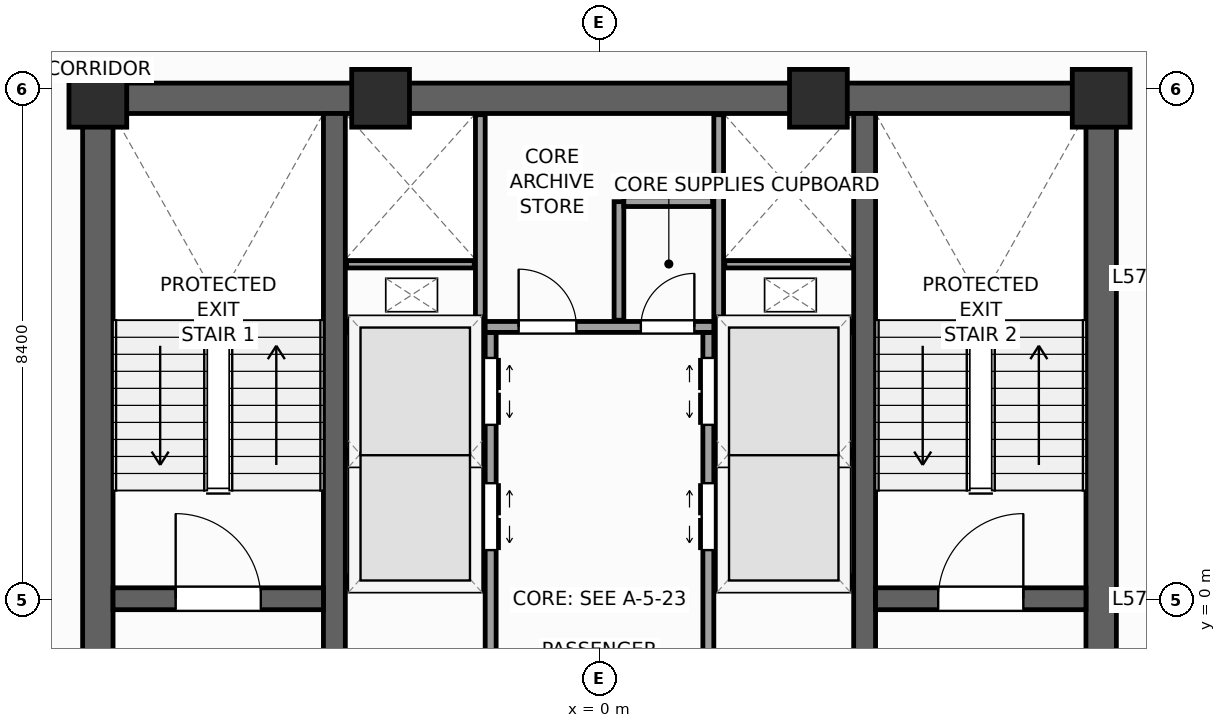
"""IFC4 building model, lengths in metres.
Left out: names, types, materials, properties, quantities, classifications, styles, units other than length and angle.
Written with IfcOpenShell. Run it as: python <this file> out.ifc"""

import sys

from ifc_helpers import new_model, si_unit, direction, frame, frame_2d, origin, origin_2d, place, context, subcontext, project, spatial, rectangle, extrude, source, transform, mapped, element, fill, save


model = new_model("IFC4")
c1 = context("Model", 3, precision=1e-05, world=origin(), true_north=direction((0.0, 1.0)))
c2 = subcontext(c1, "Body", "Model", "MODEL_VIEW")
j1 = project(units=[si_unit("LENGTHUNIT", "METRE"), si_unit("PLANEANGLEUNIT", "RADIAN")], contexts=[c1])
p1 = place(None, origin())
s1 = spatial("IfcSite", under=j1, at=p1, CompositionType="ELEMENT")
p2 = place(p1, origin())
s2 = spatial("IfcBuilding", under=s1, at=p2, CompositionType="ELEMENT")
p3 = place(p2, frame((0.0, 0.0, 236.8)))
s3 = spatial("IfcBuildingStorey", under=s2, at=p3, CompositionType="ELEMENT", Elevation=236.8)
p4 = place(p3, frame((-8.5, 8.25, 0.0), z_axis=(0.0, 0.0, 1.0), x_axis=(1.0, 0.0, 0.0)))
e1 = element("IfcWall", 1, at=p4, inside=s3, PredefinedType="SHEAR", context=c2, shape_type="SweptSolid", body=[
    extrude(rectangle(XDim=17.0, YDim=0.5, at=frame_2d((8.5, 0.0))), origin(), (0.0, 0.0, 1.0), 3.9),
])
p5 = place(p3, frame((-8.25, -8.0, 0.0), z_axis=(0.0, 0.0, 1.0), x_axis=(0.0, 1.0, 0.0)))
e2 = element("IfcWall", 2, at=p5, inside=s3, PredefinedType="SHEAR", context=c2, shape_type="SweptSolid", body=[
    extrude(rectangle(XDim=16.0, YDim=0.5, at=frame_2d((8.0, 0.0))), origin(), (0.0, 0.0, 1.0), 3.9),
])
p6 = place(p5, frame((4.69, 0.0, 0.0)))
e3 = element("IfcOpeningElement", 3, at=p6, cuts=e2, PredefinedType="OPENING", context=c2, shape_type="SweptSolid", body=[
    extrude(rectangle(XDim=1.3, YDim=2.2, at=frame_2d((0.65, 1.1))), frame((0.0, 0.26, 0.0), z_axis=(0.0, -1.0, 0.0), x_axis=(1.0, 0.0, 0.0)), (0.0, 0.0, 1.0), 0.52),
])
p7 = place(p3, frame((8.25, -8.0, 0.0), z_axis=(0.0, 0.0, 1.0), x_axis=(0.0, 1.0, 0.0)))
e4 = element("IfcWall", 4, at=p7, inside=s3, PredefinedType="SHEAR", context=c2, shape_type="SweptSolid", body=[
    extrude(rectangle(XDim=16.0, YDim=0.5, at=frame_2d((8.0, 0.0))), origin(), (0.0, 0.0, 1.0), 3.9),
])
p8 = place(p7, frame((4.69, 0.0, 0.0)))
e5 = element("IfcOpeningElement", 5, at=p8, cuts=e4, PredefinedType="OPENING", context=c2, shape_type="SweptSolid", body=[
    extrude(rectangle(XDim=1.3, YDim=2.2, at=frame_2d((0.65, 1.1))), frame((0.0, 0.26, 0.0), z_axis=(0.0, -1.0, 0.0), x_axis=(1.0, 0.0, 0.0)), (0.0, 0.0, 1.0), 0.52),
])
for number, where, z_axis, x_axis in (
    (6, (-4.36, -8.0, 0.0), (0.0, 0.0, 1.0), (0.0, 1.0, 0.0)),
    (7, (4.36, -8.0, 0.0), (0.0, 0.0, 1.0), (0.0, 1.0, 0.0)),
):
    element("IfcWall", number, at=place(p3, frame(where, z_axis=z_axis, x_axis=x_axis)), inside=s3, PredefinedType="SHEAR", context=c2, shape_type="SweptSolid", body=[
        extrude(rectangle(XDim=16.0, YDim=0.36, at=frame_2d((8.0, 0.0))), origin(), (0.0, 0.0, 1.0), 3.9),
    ])
p9 = place(p3, frame((-8.0, 0.02, 0.0), z_axis=(0.0, 0.0, 1.0), x_axis=(1.0, 0.0, 0.0)))
e8 = element("IfcWall", 8, at=p9, inside=s3, PredefinedType="SHEAR", context=c2, shape_type="SweptSolid", body=[
    extrude(rectangle(XDim=3.46, YDim=0.36, at=frame_2d((1.73, 0.0))), origin(), (0.0, 0.0, 1.0), 3.9),
])
p10 = place(p9, frame((1.03, 0.0, 0.0)))
e9 = element("IfcOpeningElement", 9, at=p10, cuts=e8, PredefinedType="OPENING", context=c2, shape_type="SweptSolid", body=[
    extrude(rectangle(XDim=1.4, YDim=2.2, at=frame_2d((0.7, 1.1))), frame((0.0, 0.19, 0.0), z_axis=(0.0, -1.0, 0.0), x_axis=(1.0, 0.0, 0.0)), (0.0, 0.0, 1.0), 0.38),
])
p11 = place(p3, frame((4.54, 0.02, 0.0), z_axis=(0.0, 0.0, 1.0), x_axis=(1.0, 0.0, 0.0)))
e10 = element("IfcWall", 10, at=p11, inside=s3, PredefinedType="SHEAR", context=c2, shape_type="SweptSolid", body=[
    extrude(rectangle(XDim=3.46, YDim=0.36, at=frame_2d((1.73, 0.0))), origin(), (0.0, 0.0, 1.0), 3.9),
])
p12 = place(p11, frame((1.03, 0.0, 0.0)))
e11 = element("IfcOpeningElement", 11, at=p12, cuts=e10, PredefinedType="OPENING", context=c2, shape_type="SweptSolid", body=[
    extrude(rectangle(XDim=1.4, YDim=2.2, at=frame_2d((0.7, 1.1))), frame((0.0, 0.19, 0.0), z_axis=(0.0, -1.0, 0.0), x_axis=(1.0, 0.0, 0.0)), (0.0, 0.0, 1.0), 0.38),
])
m1 = source(origin(), c2, "Body", "SweptSolid", [
    extrude(rectangle(XDim=0.95, YDim=0.95, at=origin_2d()), origin(), (0.0, 0.0, 1.0), 3.9),
])
for number, where, z_axis, x_axis in (
    (12, (8.25, 8.25, 0.0), (0.0, 0.0, 1.0), (1.0, 0.0, 0.0)),
    (13, (-8.25, 8.25, 0.0), (0.0, 0.0, 1.0), (1.0, 0.0, 0.0)),
    (14, (-3.6, 8.25, 0.0), (0.0, 0.0, 1.0), (1.0, 0.0, 0.0)),
    (15, (3.6, 8.25, 0.0), (0.0, 0.0, 1.0), (1.0, 0.0, 0.0)),
):
    element("IfcColumn", number, at=place(p3, frame(where, z_axis=z_axis, x_axis=x_axis)), inside=s3, PredefinedType="PILASTER", context=c2, shape_type="MappedRepresentation", body=[
        mapped(m1, transform((0.0, 0.0, 0.0), scale=1.0)),
    ])
p13 = place(p3, frame((6.733, -29.154, 0.0), z_axis=(0.0, 0.0, 1.0), x_axis=(0.629325378072, 0.77714192302, 0.0)))
e16 = element("IfcWall", 16, at=p13, inside=s3, PredefinedType="STANDARD", context=c2, shape_type="SweptSolid", body=[
    extrude(rectangle(XDim=36.84, YDim=0.34, at=frame_2d((18.42, 0.0))), origin(), (0.0, 0.0, 1.0), 2.96),
])
p14 = place(p13, frame((12.295, 0.0, 0.0)))
e17 = element("IfcOpeningElement", 17, at=p14, cuts=e16, PredefinedType="OPENING", context=c2, shape_type="SweptSolid", body=[
    extrude(rectangle(XDim=1.05, YDim=2.25, at=frame_2d((0.525, 1.125))), frame((0.0, 0.18, 0.0), z_axis=(0.0, -1.0, 0.0), x_axis=(1.0, 0.0, 0.0)), (0.0, 0.0, 1.0), 0.36),
])
p15 = place(p13, frame((3.721, 0.0, 0.48)))
e18 = element("IfcOpeningElement", 18, at=p15, cuts=e16, PredefinedType="OPENING", context=c2, shape_type="SweptSolid", body=[
    extrude(rectangle(XDim=1.4, YDim=2.4, at=frame_2d((0.7, 1.2))), frame((0.0, 0.18, 0.0), z_axis=(0.0, -1.0, 0.0), x_axis=(1.0, 0.0, 0.0)), (0.0, 0.0, 1.0), 0.36),
])
p16 = place(p13, frame((7.559, 0.0, 0.58)))
e19 = element("IfcOpeningElement", 19, at=p16, cuts=e16, PredefinedType="OPENING", context=c2, shape_type="SweptSolid", body=[
    extrude(rectangle(XDim=1.75, YDim=2.3, at=frame_2d((0.875, 1.15))), frame((0.0, 0.18, 0.0), z_axis=(0.0, -1.0, 0.0), x_axis=(1.0, 0.0, 0.0)), (0.0, 0.0, 1.0), 0.36),
])
p17 = place(p13, frame((16.058, 0.0, 0.58)))
e20 = element("IfcOpeningElement", 20, at=p17, cuts=e16, PredefinedType="OPENING", context=c2, shape_type="SweptSolid", body=[
    extrude(rectangle(XDim=1.75, YDim=2.3, at=frame_2d((0.875, 1.15))), frame((0.0, 0.18, 0.0), z_axis=(0.0, -1.0, 0.0), x_axis=(1.0, 0.0, 0.0)), (0.0, 0.0, 1.0), 0.36),
])
p18 = place(p13, frame((24.176, 0.0, 0.58)))
e21 = element("IfcOpeningElement", 21, at=p18, cuts=e16, PredefinedType="OPENING", context=c2, shape_type="SweptSolid", body=[
    extrude(rectangle(XDim=1.75, YDim=2.3, at=frame_2d((0.875, 1.15))), frame((0.0, 0.18, 0.0), z_axis=(0.0, -1.0, 0.0), x_axis=(1.0, 0.0, 0.0)), (0.0, 0.0, 1.0), 0.36),
])
p19 = place(p13, frame((30.982, 0.0, 0.48)))
e22 = element("IfcOpeningElement", 22, at=p19, cuts=e16, PredefinedType="OPENING", context=c2, shape_type="SweptSolid", body=[
    extrude(rectangle(XDim=1.4, YDim=2.4, at=frame_2d((0.7, 1.2))), frame((0.0, 0.18, 0.0), z_axis=(0.0, -1.0, 0.0), x_axis=(1.0, 0.0, 0.0)), (0.0, 0.0, 1.0), 0.36),
])
p20 = place(p3, frame((29.154, 6.733, 0.0), z_axis=(0.0, 0.0, 1.0), x_axis=(-0.77714192302, 0.629325378072, 0.0)))
e23 = element("IfcWall", 23, at=p20, inside=s3, PredefinedType="STANDARD", context=c2, shape_type="SweptSolid", body=[
    extrude(rectangle(XDim=36.84, YDim=0.34, at=frame_2d((18.42, 0.0))), origin(), (0.0, 0.0, 1.0), 2.96),
])
p21 = place(p20, frame((3.721, 0.0, 0.48)))
e24 = element("IfcOpeningElement", 24, at=p21, cuts=e23, PredefinedType="OPENING", context=c2, shape_type="SweptSolid", body=[
    extrude(rectangle(XDim=1.4, YDim=2.4, at=frame_2d((0.7, 1.2))), frame((0.0, 0.18, 0.0), z_axis=(0.0, -1.0, 0.0), x_axis=(1.0, 0.0, 0.0)), (0.0, 0.0, 1.0), 0.36),
])
p22 = place(p20, frame((9.809, 0.0, 0.58)))
e25 = element("IfcOpeningElement", 25, at=p22, cuts=e23, PredefinedType="OPENING", context=c2, shape_type="SweptSolid", body=[
    extrude(rectangle(XDim=1.75, YDim=2.3, at=frame_2d((0.875, 1.15))), frame((0.0, 0.18, 0.0), z_axis=(0.0, -1.0, 0.0), x_axis=(1.0, 0.0, 0.0)), (0.0, 0.0, 1.0), 0.36),
])
p23 = place(p20, frame((16.058, 0.0, 0.58)))
e26 = element("IfcOpeningElement", 26, at=p23, cuts=e23, PredefinedType="OPENING", context=c2, shape_type="SweptSolid", body=[
    extrude(rectangle(XDim=1.75, YDim=2.3, at=frame_2d((0.875, 1.15))), frame((0.0, 0.18, 0.0), z_axis=(0.0, -1.0, 0.0), x_axis=(1.0, 0.0, 0.0)), (0.0, 0.0, 1.0), 0.36),
])
p24 = place(p20, frame((24.176, 0.0, 0.58)))
e27 = element("IfcOpeningElement", 27, at=p24, cuts=e23, PredefinedType="OPENING", context=c2, shape_type="SweptSolid", body=[
    extrude(rectangle(XDim=1.75, YDim=2.3, at=frame_2d((0.875, 1.15))), frame((0.0, 0.18, 0.0), z_axis=(0.0, -1.0, 0.0), x_axis=(1.0, 0.0, 0.0)), (0.0, 0.0, 1.0), 0.36),
])
p25 = place(p20, frame((32.482, 0.0, 0.48)))
e28 = element("IfcOpeningElement", 28, at=p25, cuts=e23, PredefinedType="OPENING", context=c2, shape_type="SweptSolid", body=[
    extrude(rectangle(XDim=1.4, YDim=2.4, at=frame_2d((0.7, 1.2))), frame((0.0, 0.18, 0.0), z_axis=(0.0, -1.0, 0.0), x_axis=(1.0, 0.0, 0.0)), (0.0, 0.0, 1.0), 0.36),
])
p26 = place(p3, frame((-6.733, 29.154, 0.0), z_axis=(0.0, 0.0, 1.0), x_axis=(-0.629325378072, -0.77714192302, 0.0)))
e29 = element("IfcWall", 29, at=p26, inside=s3, PredefinedType="STANDARD", context=c2, shape_type="SweptSolid", body=[
    extrude(rectangle(XDim=36.84, YDim=0.34, at=frame_2d((18.42, 0.0))), origin(), (0.0, 0.0, 1.0), 2.96),
])
p27 = place(p26, frame((12.295, 0.0, 0.0)))
e30 = element("IfcOpeningElement", 30, at=p27, cuts=e29, PredefinedType="OPENING", context=c2, shape_type="SweptSolid", body=[
    extrude(rectangle(XDim=1.05, YDim=2.25, at=frame_2d((0.525, 1.125))), frame((0.0, 0.18, 0.0), z_axis=(0.0, -1.0, 0.0), x_axis=(1.0, 0.0, 0.0)), (0.0, 0.0, 1.0), 0.36),
])
p28 = place(p26, frame((3.721, 0.0, 0.48)))
e31 = element("IfcOpeningElement", 31, at=p28, cuts=e29, PredefinedType="OPENING", context=c2, shape_type="SweptSolid", body=[
    extrude(rectangle(XDim=1.4, YDim=2.4, at=frame_2d((0.7, 1.2))), frame((0.0, 0.18, 0.0), z_axis=(0.0, -1.0, 0.0), x_axis=(1.0, 0.0, 0.0)), (0.0, 0.0, 1.0), 0.36),
])
p29 = place(p26, frame((7.559, 0.0, 0.58)))
e32 = element("IfcOpeningElement", 32, at=p29, cuts=e29, PredefinedType="OPENING", context=c2, shape_type="SweptSolid", body=[
    extrude(rectangle(XDim=1.75, YDim=2.3, at=frame_2d((0.875, 1.15))), frame((0.0, 0.18, 0.0), z_axis=(0.0, -1.0, 0.0), x_axis=(1.0, 0.0, 0.0)), (0.0, 0.0, 1.0), 0.36),
])
p30 = place(p26, frame((16.058, 0.0, 0.58)))
e33 = element("IfcOpeningElement", 33, at=p30, cuts=e29, PredefinedType="OPENING", context=c2, shape_type="SweptSolid", body=[
    extrude(rectangle(XDim=1.75, YDim=2.3, at=frame_2d((0.875, 1.15))), frame((0.0, 0.18, 0.0), z_axis=(0.0, -1.0, 0.0), x_axis=(1.0, 0.0, 0.0)), (0.0, 0.0, 1.0), 0.36),
])
p31 = place(p26, frame((24.176, 0.0, 0.58)))
e34 = element("IfcOpeningElement", 34, at=p31, cuts=e29, PredefinedType="OPENING", context=c2, shape_type="SweptSolid", body=[
    extrude(rectangle(XDim=1.75, YDim=2.3, at=frame_2d((0.875, 1.15))), frame((0.0, 0.18, 0.0), z_axis=(0.0, -1.0, 0.0), x_axis=(1.0, 0.0, 0.0)), (0.0, 0.0, 1.0), 0.36),
])
p32 = place(p26, frame((30.982, 0.0, 0.48)))
e35 = element("IfcOpeningElement", 35, at=p32, cuts=e29, PredefinedType="OPENING", context=c2, shape_type="SweptSolid", body=[
    extrude(rectangle(XDim=1.4, YDim=2.4, at=frame_2d((0.7, 1.2))), frame((0.0, 0.18, 0.0), z_axis=(0.0, -1.0, 0.0), x_axis=(1.0, 0.0, 0.0)), (0.0, 0.0, 1.0), 0.36),
])
p33 = place(p3, frame((-1.79, -7.98, 0.0), z_axis=(0.0, 0.0, 1.0), x_axis=(0.0, 1.0, 0.0)))
e36 = element("IfcWall", 36, at=p33, inside=s3, PredefinedType="PARTITIONING", context=c2, shape_type="SweptSolid", body=[
    extrude(rectangle(XDim=12.38, YDim=0.18, at=frame_2d((6.19, 0.0))), origin(), (0.0, 0.0, 1.0), 3.66),
])
p34 = place(p33, frame((8.8, 0.0, 0.0)))
e37 = element("IfcOpeningElement", 37, at=p34, cuts=e36, PredefinedType="OPENING", context=c2, shape_type="SweptSolid", body=[
    extrude(rectangle(XDim=1.1, YDim=2.2, at=frame_2d((0.55, 1.1))), frame((0.0, 0.1, 0.0), z_axis=(0.0, -1.0, 0.0), x_axis=(1.0, 0.0, 0.0)), (0.0, 0.0, 1.0), 0.2),
])
p35 = place(p33, frame((10.86, 0.0, 0.0)))
e38 = element("IfcOpeningElement", 38, at=p35, cuts=e36, PredefinedType="OPENING", context=c2, shape_type="SweptSolid", body=[
    extrude(rectangle(XDim=1.1, YDim=2.2, at=frame_2d((0.55, 1.1))), frame((0.0, 0.1, 0.0), z_axis=(0.0, -1.0, 0.0), x_axis=(1.0, 0.0, 0.0)), (0.0, 0.0, 1.0), 0.2),
])
p36 = place(p33, frame((3.5, 0.0, 0.0)))
e39 = element("IfcOpeningElement", 39, at=p36, cuts=e36, PredefinedType="OPENING", context=c2, shape_type="SweptSolid", body=[
    extrude(rectangle(XDim=1.15, YDim=2.25, at=frame_2d((0.575, 1.125))), frame((0.0, 0.1, 0.0), z_axis=(0.0, -1.0, 0.0), x_axis=(1.0, 0.0, 0.0)), (0.0, 0.0, 1.0), 0.2),
])
p37 = place(p3, frame((1.79, -7.98, 0.0), z_axis=(0.0, 0.0, 1.0), x_axis=(0.0, 1.0, 0.0)))
e40 = element("IfcWall", 40, at=p37, inside=s3, PredefinedType="PARTITIONING", context=c2, shape_type="SweptSolid", body=[
    extrude(rectangle(XDim=12.38, YDim=0.18, at=frame_2d((6.19, 0.0))), origin(), (0.0, 0.0, 1.0), 3.66),
])
p38 = place(p37, frame((8.8, 0.0, 0.0)))
e41 = element("IfcOpeningElement", 41, at=p38, cuts=e40, PredefinedType="OPENING", context=c2, shape_type="SweptSolid", body=[
    extrude(rectangle(XDim=1.1, YDim=2.2, at=frame_2d((0.55, 1.1))), frame((0.0, 0.1, 0.0), z_axis=(0.0, -1.0, 0.0), x_axis=(1.0, 0.0, 0.0)), (0.0, 0.0, 1.0), 0.2),
])
p39 = place(p37, frame((10.86, 0.0, 0.0)))
e42 = element("IfcOpeningElement", 42, at=p39, cuts=e40, PredefinedType="OPENING", context=c2, shape_type="SweptSolid", body=[
    extrude(rectangle(XDim=1.1, YDim=2.2, at=frame_2d((0.55, 1.1))), frame((0.0, 0.1, 0.0), z_axis=(0.0, -1.0, 0.0), x_axis=(1.0, 0.0, 0.0)), (0.0, 0.0, 1.0), 0.2),
])
p40 = place(p37, frame((3.5, 0.0, 0.0)))
e43 = element("IfcOpeningElement", 43, at=p40, cuts=e40, PredefinedType="OPENING", context=c2, shape_type="SweptSolid", body=[
    extrude(rectangle(XDim=1.15, YDim=2.25, at=frame_2d((0.575, 1.125))), frame((0.0, 0.1, 0.0), z_axis=(0.0, -1.0, 0.0), x_axis=(1.0, 0.0, 0.0)), (0.0, 0.0, 1.0), 0.2),
])
p41 = place(p3, frame((-1.88, 4.49, 0.0), z_axis=(0.0, 0.0, 1.0), x_axis=(1.0, 0.0, 0.0)))
e44 = element("IfcWall", 44, at=p41, inside=s3, PredefinedType="PARTITIONING", context=c2, shape_type="SweptSolid", body=[
    extrude(rectangle(XDim=3.76, YDim=0.18, at=frame_2d((1.88, 0.0))), origin(), (0.0, 0.0, 1.0), 3.66),
])
p42 = place(p41, frame((0.55, 0.0, 0.0)))
e45 = element("IfcOpeningElement", 45, at=p42, cuts=e44, PredefinedType="OPENING", context=c2, shape_type="SweptSolid", body=[
    extrude(rectangle(XDim=0.95, YDim=2.1, at=frame_2d((0.475, 1.05))), frame((0.0, 0.1, 0.0), z_axis=(0.0, -1.0, 0.0), x_axis=(1.0, 0.0, 0.0)), (0.0, 0.0, 1.0), 0.2),
])
p43 = place(p41, frame((2.56, 0.0, 0.0)))
e46 = element("IfcOpeningElement", 46, at=p43, cuts=e44, PredefinedType="OPENING", context=c2, shape_type="SweptSolid", body=[
    extrude(rectangle(XDim=0.88, YDim=2.1, at=frame_2d((0.44, 1.05))), frame((0.0, 0.1, 0.0), z_axis=(0.0, -1.0, 0.0), x_axis=(1.0, 0.0, 0.0)), (0.0, 0.0, 1.0), 0.2),
])
for number, where, z_axis, x_axis in (
    (47, (-4.17, 0.3, 0.0), (0.0, 0.0, 1.0), (1.0, 0.0, 0.0)),
    (48, (1.89, 0.3, 0.0), (0.0, 0.0, 1.0), (1.0, 0.0, 0.0)),
    (49, (-4.17, 4.49, 0.0), (0.0, 0.0, 1.0), (1.0, 0.0, 0.0)),
    (50, (1.89, 4.49, 0.0), (0.0, 0.0, 1.0), (1.0, 0.0, 0.0)),
):
    element("IfcWall", number, at=place(p3, frame(where, z_axis=z_axis, x_axis=x_axis)), inside=s3, PredefinedType="PARTITIONING", context=c2, shape_type="SweptSolid", body=[
        extrude(rectangle(XDim=2.28, YDim=0.18, at=frame_2d((1.14, 0.0))), origin(), (0.0, 0.0, 1.0), 3.66),
    ])
for number, where, z_axis, x_axis in (
    (51, (-4.16, 2.4, 0.0), (0.0, 0.0, 1.0), (1.0, 0.0, 0.0)),
    (52, (1.9, 2.4, 0.0), (0.0, 0.0, 1.0), (1.0, 0.0, 0.0)),
):
    element("IfcWall", number, at=place(p3, frame(where, z_axis=z_axis, x_axis=x_axis)), inside=s3, PredefinedType="PARTITIONING", context=c2, shape_type="SweptSolid", body=[
        extrude(rectangle(XDim=2.26, YDim=0.12, at=frame_2d((1.13, 0.0))), origin(), (0.0, 0.0, 1.0), 3.66),
    ])
for number, where, z_axis, x_axis in (
    (53, (-1.96, 4.58, 0.0), (0.0, 0.0, 1.0), (0.0, 1.0, 0.0)),
    (54, (1.96, 4.58, 0.0), (0.0, 0.0, 1.0), (0.0, 1.0, 0.0)),
):
    element("IfcWall", number, at=place(p3, frame(where, z_axis=z_axis, x_axis=x_axis)), inside=s3, PredefinedType="PARTITIONING", context=c2, shape_type="SweptSolid", body=[
        extrude(rectangle(XDim=3.4, YDim=0.16, at=frame_2d((1.7, 0.0))), origin(), (0.0, 0.0, 1.0), 3.66),
    ])
for number, where, z_axis, x_axis in (
    (55, (-4.16, 5.52, 0.0), (0.0, 0.0, 1.0), (1.0, 0.0, 0.0)),
    (56, (2.06, 5.52, 0.0), (0.0, 0.0, 1.0), (1.0, 0.0, 0.0)),
):
    element("IfcWall", number, at=place(p3, frame(where, z_axis=z_axis, x_axis=x_axis)), inside=s3, PredefinedType="PARTITIONING", context=c2, shape_type="SweptSolid", body=[
        extrude(rectangle(XDim=2.1, YDim=0.12, at=frame_2d((1.05, 0.0))), origin(), (0.0, 0.0, 1.0), 3.66),
    ])
p44 = place(p3, frame((0.32, 4.6, 0.0), z_axis=(0.0, 0.0, 1.0), x_axis=(0.0, 1.0, 0.0)))
e57 = element("IfcWall", 57, at=p44, inside=s3, PredefinedType="PARTITIONING", context=c2, shape_type="SweptSolid", body=[
    extrude(rectangle(XDim=1.95, YDim=0.16, at=frame_2d((0.975, 0.0))), origin(), (0.0, 0.0, 1.0), 3.66),
])
p45 = place(p3, frame((0.4, 6.55, 0.0), z_axis=(0.0, 0.0, 1.0), x_axis=(1.0, 0.0, 0.0)))
e58 = element("IfcWall", 58, at=p45, inside=s3, PredefinedType="PARTITIONING", context=c2, shape_type="SweptSolid", body=[
    extrude(rectangle(XDim=1.46, YDim=0.16, at=frame_2d((0.73, 0.0))), origin(), (0.0, 0.0, 1.0), 3.66),
])
m2 = source(origin(), c2, "Body", "SweptSolid", [
    extrude(rectangle(XDim=1.4, YDim=2.2, at=frame_2d((0.7, 1.1))), frame((0.0, 0.025, 0.0), z_axis=(0.0, -1.0, 0.0), x_axis=(1.0, 0.0, 0.0)), (0.0, 0.0, 1.0), 0.05),
])
p46 = place(p10, origin())
e59 = element("IfcDoor", 59, at=p46, inside=s3, OperationType="SINGLE_SWING_LEFT", PredefinedType="DOOR", context=c2, shape_type="MappedRepresentation", body=[
    mapped(m2, transform((0.0, 0.0, 0.0), scale=1.0)),
])
fill(e9, e59)
p47 = place(p12, origin())
e60 = element("IfcDoor", 60, at=p47, inside=s3, OperationType="SINGLE_SWING_RIGHT", PredefinedType="DOOR", context=c2, shape_type="MappedRepresentation", body=[
    mapped(m2, transform((0.0, 0.0, 0.0), scale=1.0)),
])
fill(e11, e60)
m3 = source(origin(), c2, "Body", "SweptSolid", [
    extrude(rectangle(XDim=1.1, YDim=2.2, at=frame_2d((0.55, 1.1))), frame((0.0, 0.025, 0.0), z_axis=(0.0, -1.0, 0.0), x_axis=(1.0, 0.0, 0.0)), (0.0, 0.0, 1.0), 0.05),
])
p48 = place(p34, frame((1.1, 0.0, 0.0), z_axis=(0.0, 0.0, 1.0), x_axis=(-1.0, 0.0, 0.0)))
e61 = element("IfcDoor", 61, at=p48, inside=s3, OperationType="DOUBLE_DOOR_SLIDING", PredefinedType="DOOR", context=c2, shape_type="MappedRepresentation", body=[
    mapped(m3, transform((0.0, 0.0, 0.0), scale=1.0)),
])
fill(e37, e61)
p49 = place(p35, frame((1.1, 0.0, 0.0), z_axis=(0.0, 0.0, 1.0), x_axis=(-1.0, 0.0, 0.0)))
e62 = element("IfcDoor", 62, at=p49, inside=s3, OperationType="DOUBLE_DOOR_SLIDING", PredefinedType="DOOR", context=c2, shape_type="MappedRepresentation", body=[
    mapped(m3, transform((0.0, 0.0, 0.0), scale=1.0)),
])
fill(e38, e62)
p50 = place(p38, origin())
e63 = element("IfcDoor", 63, at=p50, inside=s3, OperationType="DOUBLE_DOOR_SLIDING", PredefinedType="DOOR", context=c2, shape_type="MappedRepresentation", body=[
    mapped(m3, transform((0.0, 0.0, 0.0), scale=1.0)),
])
fill(e41, e63)
p51 = place(p39, origin())
e64 = element("IfcDoor", 64, at=p51, inside=s3, OperationType="DOUBLE_DOOR_SLIDING", PredefinedType="DOOR", context=c2, shape_type="MappedRepresentation", body=[
    mapped(m3, transform((0.0, 0.0, 0.0), scale=1.0)),
])
fill(e42, e64)
m4 = source(origin(), c2, "Body", "SweptSolid", [
    extrude(rectangle(XDim=0.95, YDim=2.1, at=frame_2d((0.475, 1.05))), frame((0.0, 0.025, 0.0), z_axis=(0.0, -1.0, 0.0), x_axis=(1.0, 0.0, 0.0)), (0.0, 0.0, 1.0), 0.05),
])
p52 = place(p42, origin())
e65 = element("IfcDoor", 65, at=p52, inside=s3, OperationType="SINGLE_SWING_LEFT", PredefinedType="DOOR", context=c2, shape_type="MappedRepresentation", body=[
    mapped(m4, transform((0.0, 0.0, 0.0), scale=1.0)),
])
fill(e45, e65)
m5 = source(origin(), c2, "Body", "SweptSolid", [
    extrude(rectangle(XDim=0.88, YDim=2.1, at=frame_2d((0.44, 1.05))), frame((0.0, 0.025, 0.0), z_axis=(0.0, -1.0, 0.0), x_axis=(1.0, 0.0, 0.0)), (0.0, 0.0, 1.0), 0.05),
])
p53 = place(p43, origin())
e66 = element("IfcDoor", 66, at=p53, inside=s3, OperationType="SINGLE_SWING_RIGHT", PredefinedType="DOOR", context=c2, shape_type="MappedRepresentation", body=[
    mapped(m5, transform((0.0, 0.0, 0.0), scale=1.0)),
])
fill(e46, e66)
save(model, sys.argv[1])
